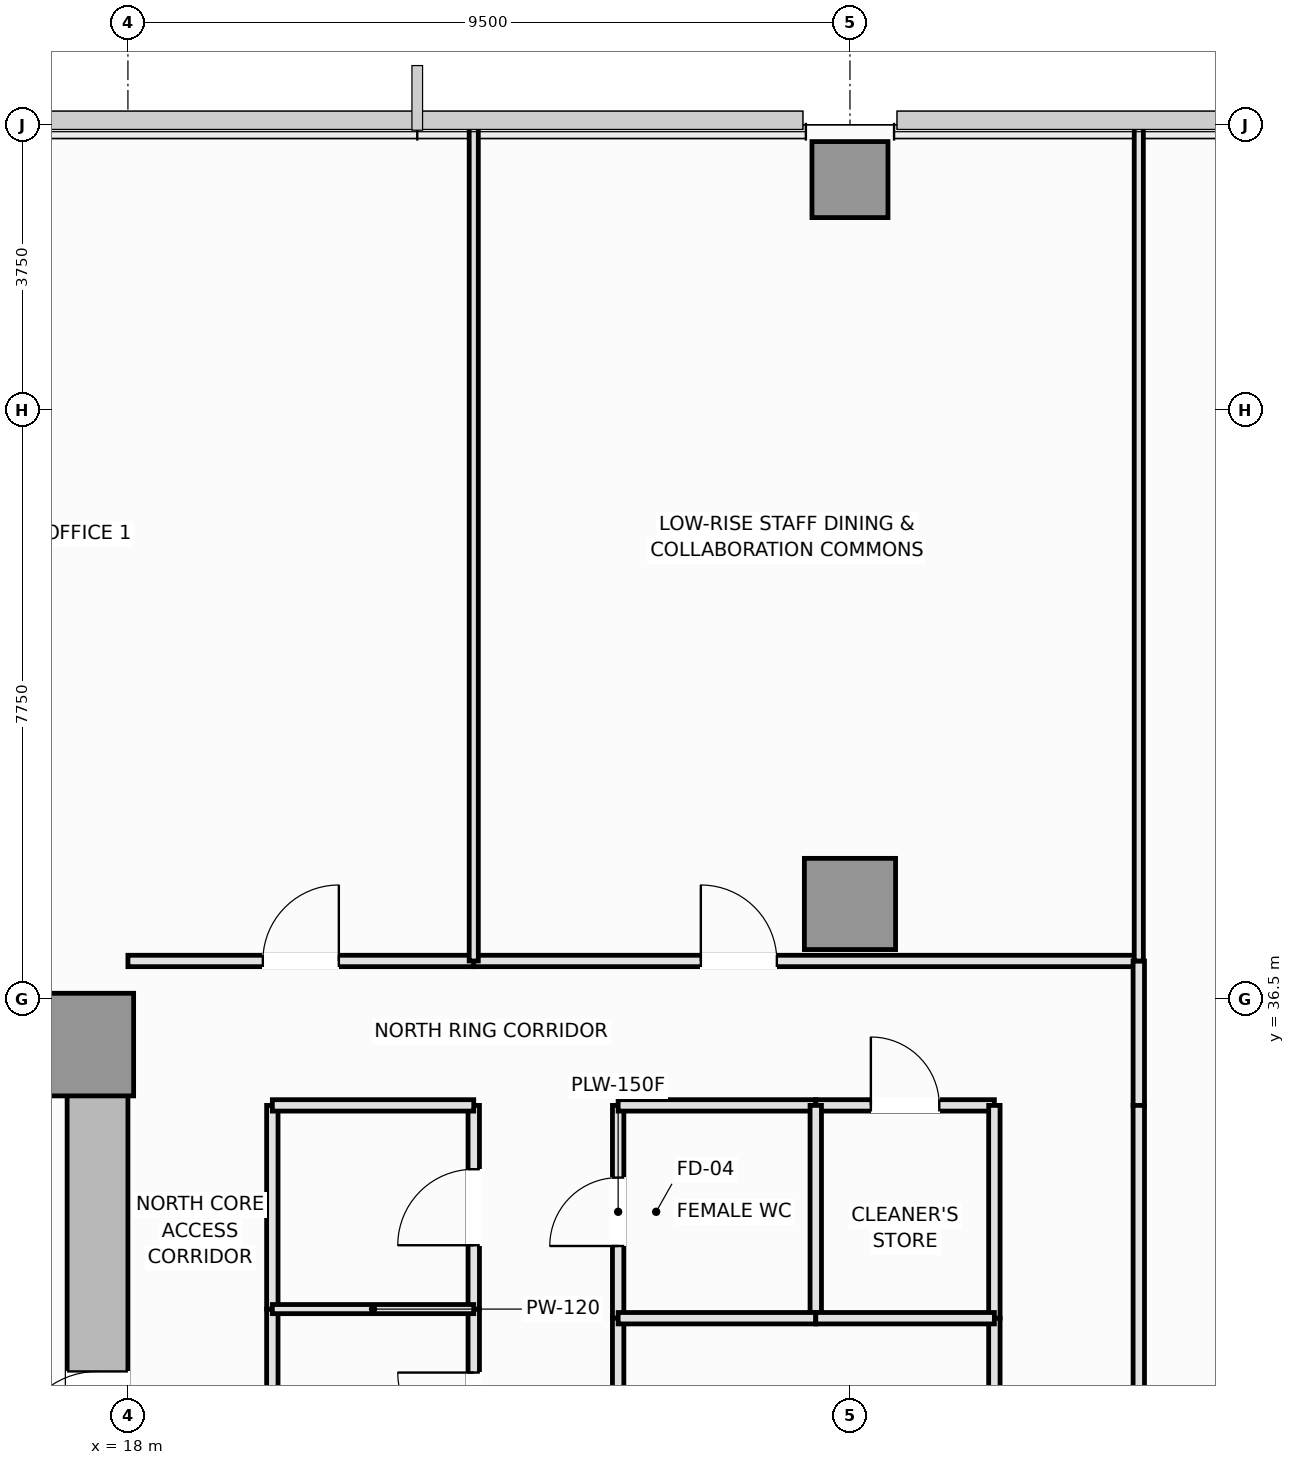
"""IFC4 building model, lengths in metres.
Left out: names, types, materials, properties, quantities, classifications, styles, units other than length and angle.
Written with IfcOpenShell. Run it as: python <this file> out.ifc"""

import sys

from ifc_helpers import new_model, si_unit, direction, frame, frame_2d, origin, origin_2d, place, context, subcontext, project, spatial, rectangle, extrude, element, fill, save


model = new_model("IFC4")
c1 = context("Model", 3, precision=1e-05, world=origin(), true_north=direction((0.0, 1.0)))
c2 = subcontext(c1, "Body", "Model", "MODEL_VIEW")
j1 = project(units=[si_unit("LENGTHUNIT", "METRE"), si_unit("PLANEANGLEUNIT", "RADIAN")], contexts=[c1])
p1 = place(None, origin())
s1 = spatial("IfcSite", under=j1, at=p1, CompositionType="ELEMENT")
p2 = place(p1, origin())
s2 = spatial("IfcBuilding", under=s1, at=p2, CompositionType="ELEMENT")
p3 = place(p2, frame((0.0, 0.0, 89.5)))
s3 = spatial("IfcBuildingStorey", under=s2, at=p3, CompositionType="ELEMENT", Elevation=89.5)
p4 = place(p3, frame((4.5, 36.1, 0.0), z_axis=(0.0, 0.0, 1.0), x_axis=(1.0, 0.0, 0.0)))
e1 = element("IfcWall", 1, at=p4, inside=s3, PredefinedType="SHEAR", context=c2, shape_type="SweptSolid", body=[
    extrude(rectangle(XDim=13.5, YDim=0.8, at=frame_2d((6.75, 0.0))), origin(), (0.0, 0.0, 1.0), 3.55),
])
p5 = place(p3, frame((17.6, 27.05, 0.0), z_axis=(0.0, 0.0, 1.0), x_axis=(0.0, 1.0, 0.0)))
e2 = element("IfcWall", 2, at=p5, inside=s3, PredefinedType="SHEAR", context=c2, shape_type="SweptSolid", body=[
    extrude(rectangle(XDim=8.65, YDim=0.8, at=frame_2d((4.325, 0.0))), origin(), (0.0, 0.0, 1.0), 3.55),
])
p6 = place(p5, frame((3.45, 0.0, 0.0)))
e3 = element("IfcOpeningElement", 3, at=p6, cuts=e2, PredefinedType="OPENING", context=c2, shape_type="SweptSolid", body=[
    extrude(rectangle(XDim=1.1, YDim=2.15, at=frame_2d((0.55, 1.075))), frame((0.0, 0.41, 0.0), z_axis=(0.0, -1.0, 0.0), x_axis=(1.0, 0.0, 0.0)), (0.0, 0.0, 1.0), 0.82),
])
p7 = place(p3, frame((17.4, 35.9, 0.0), z_axis=(0.0, 0.0, 1.0), x_axis=(1.0, 0.0, 0.0)))
e4 = element("IfcColumn", 4, at=p7, inside=s3, PredefinedType="PILASTER", context=c2, shape_type="SweptSolid", body=[
    extrude(rectangle(XDim=1.35, YDim=1.35, at=origin_2d()), origin(), (0.0, 0.0, 1.0), 3.55),
])
p8 = place(p3, frame((27.5, 37.75, 0.0), z_axis=(0.0, 0.0, 1.0), x_axis=(1.0, 0.0, 0.0)))
e5 = element("IfcColumn", 5, at=p8, inside=s3, PredefinedType="COLUMN", context=c2, shape_type="SweptSolid", body=[
    extrude(rectangle(XDim=1.2, YDim=1.2, at=origin_2d()), origin(), (0.0, 0.0, 1.0), 3.55),
])
p9 = place(p3, frame((27.5, 47.28, 0.0), z_axis=(0.0, 0.0, 1.0), x_axis=(1.0, 0.0, 0.0)))
e6 = element("IfcColumn", 6, at=p9, inside=s3, PredefinedType="COLUMN", context=c2, shape_type="SweptSolid", body=[
    extrude(rectangle(XDim=1.0, YDim=1.0, at=origin_2d()), origin(), (0.0, 0.0, 1.0), 3.55),
])
p10 = place(p3, frame((22.55, 29.75, 0.0), z_axis=(0.0, 0.0, 1.0), x_axis=(0.0, 1.0, 0.0)))
e7 = element("IfcWall", 7, at=p10, inside=s3, PredefinedType="PARTITIONING", context=c2, shape_type="SweptSolid", body=[
    extrude(rectangle(XDim=2.67, YDim=0.15, at=frame_2d((1.335, 0.0))), origin(), (0.0, 0.0, 1.0), 2.99),
])
p11 = place(p10, frame((0.835, 0.0, 0.0)))
e8 = element("IfcOpeningElement", 8, at=p11, cuts=e7, PredefinedType="OPENING", context=c2, shape_type="SweptSolid", body=[
    extrude(rectangle(XDim=1.0, YDim=2.15, at=frame_2d((0.5, 1.075))), frame((0.0, 0.085, 0.0), z_axis=(0.0, -1.0, 0.0), x_axis=(1.0, 0.0, 0.0)), (0.0, 0.0, 1.0), 0.17),
])
p12 = place(p3, frame((22.55, 32.42, 0.0), z_axis=(0.0, 0.0, 1.0), x_axis=(0.0, 1.0, 0.0)))
e9 = element("IfcWall", 9, at=p12, inside=s3, PredefinedType="PARTITIONING", context=c2, shape_type="SweptSolid", body=[
    extrude(rectangle(XDim=2.68, YDim=0.15, at=frame_2d((1.34, 0.0))), origin(), (0.0, 0.0, 1.0), 2.99),
])
p13 = place(p12, frame((0.84, 0.0, 0.0)))
e10 = element("IfcOpeningElement", 10, at=p13, cuts=e9, PredefinedType="OPENING", context=c2, shape_type="SweptSolid", body=[
    extrude(rectangle(XDim=1.0, YDim=2.15, at=frame_2d((0.5, 1.075))), frame((0.0, 0.085, 0.0), z_axis=(0.0, -1.0, 0.0), x_axis=(1.0, 0.0, 0.0)), (0.0, 0.0, 1.0), 0.17),
])
p14 = place(p3, frame((24.45, 32.3, 0.0), z_axis=(0.0, 0.0, 1.0), x_axis=(0.0, 1.0, 0.0)))
e11 = element("IfcWall", 11, at=p14, inside=s3, PredefinedType="PLUMBINGWALL", context=c2, shape_type="SweptSolid", body=[
    extrude(rectangle(XDim=2.8, YDim=0.15, at=frame_2d((1.4, 0.0))), origin(), (0.0, 0.0, 1.0), 3.35),
])
p15 = place(p14, frame((0.95, 0.0, 0.0)))
e12 = element("IfcOpeningElement", 12, at=p15, cuts=e11, PredefinedType="OPENING", context=c2, shape_type="SweptSolid", body=[
    extrude(rectangle(XDim=0.9, YDim=2.1, at=frame_2d((0.45, 1.05))), frame((0.0, 0.085, 0.0), z_axis=(0.0, -1.0, 0.0), x_axis=(1.0, 0.0, 0.0)), (0.0, 0.0, 1.0), 0.17),
])
p16 = place(p3, frame((24.45, 29.3, 0.0), z_axis=(0.0, 0.0, 1.0), x_axis=(0.0, 1.0, 0.0)))
e13 = element("IfcWall", 13, at=p16, inside=s3, PredefinedType="PARTITIONING", context=c2, shape_type="SweptSolid", body=[
    extrude(rectangle(XDim=3.0, YDim=0.15, at=frame_2d((1.5, 0.0))), origin(), (0.0, 0.0, 1.0), 3.35),
])
p17 = place(p16, frame((1.0, 0.0, 0.0)))
e14 = element("IfcOpeningElement", 14, at=p17, cuts=e13, PredefinedType="OPENING", context=c2, shape_type="SweptSolid", body=[
    extrude(rectangle(XDim=1.0, YDim=2.15, at=frame_2d((0.5, 1.075))), frame((0.0, 0.085, 0.0), z_axis=(0.0, -1.0, 0.0), x_axis=(1.0, 0.0, 0.0)), (0.0, 0.0, 1.0), 0.17),
])
p18 = place(p3, frame((19.9, 29.75, 0.0), z_axis=(0.0, 0.0, 1.0), x_axis=(0.0, 1.0, 0.0)))
e15 = element("IfcWall", 15, at=p18, inside=s3, PredefinedType="PARTITIONING", context=c2, shape_type="SweptSolid", body=[
    extrude(rectangle(XDim=2.67, YDim=0.15, at=frame_2d((1.335, 0.0))), origin(), (0.0, 0.0, 1.0), 3.35),
])
p19 = place(p3, frame((19.9, 32.42, 0.0), z_axis=(0.0, 0.0, 1.0), x_axis=(0.0, 1.0, 0.0)))
e16 = element("IfcWall", 16, at=p19, inside=s3, PredefinedType="PARTITIONING", context=c2, shape_type="SweptSolid", body=[
    extrude(rectangle(XDim=2.68, YDim=0.15, at=frame_2d((1.34, 0.0))), origin(), (0.0, 0.0, 1.0), 3.35),
])
p20 = place(p3, frame((19.9, 35.1, 0.0), z_axis=(0.0, 0.0, 1.0), x_axis=(1.0, 0.0, 0.0)))
e17 = element("IfcWall", 17, at=p20, inside=s3, PredefinedType="PARTITIONING", context=c2, shape_type="SweptSolid", body=[
    extrude(rectangle(XDim=2.65, YDim=0.15, at=frame_2d((1.325, 0.0))), origin(), (0.0, 0.0, 1.0), 3.35),
])
p21 = place(p3, frame((24.45, 35.1, 0.0), z_axis=(0.0, 0.0, 1.0), x_axis=(1.0, 0.0, 0.0)))
e18 = element("IfcWall", 18, at=p21, inside=s3, PredefinedType="PLUMBINGWALL", context=c2, shape_type="SweptSolid", body=[
    extrude(rectangle(XDim=2.6, YDim=0.15, at=frame_2d((1.3, 0.0))), origin(), (0.0, 0.0, 1.0), 3.35),
])
p22 = place(p3, frame((27.05, 35.1, 0.0), z_axis=(0.0, 0.0, 1.0), x_axis=(1.0, 0.0, 0.0)))
e19 = element("IfcWall", 19, at=p22, inside=s3, PredefinedType="PLUMBINGWALL", context=c2, shape_type="SweptSolid", body=[
    extrude(rectangle(XDim=2.35, YDim=0.15, at=frame_2d((1.175, 0.0))), origin(), (0.0, 0.0, 1.0), 3.35),
])
p23 = place(p22, frame((0.725, 0.0, 0.0)))
e20 = element("IfcOpeningElement", 20, at=p23, cuts=e19, PredefinedType="OPENING", context=c2, shape_type="SweptSolid", body=[
    extrude(rectangle(XDim=0.9, YDim=2.1, at=frame_2d((0.45, 1.05))), frame((0.0, 0.085, 0.0), z_axis=(0.0, -1.0, 0.0), x_axis=(1.0, 0.0, 0.0)), (0.0, 0.0, 1.0), 0.17),
])
p24 = place(p3, frame((18.0, 37.0, 0.0), z_axis=(0.0, 0.0, 1.0), x_axis=(1.0, 0.0, 0.0)))
e21 = element("IfcWall", 21, at=p24, inside=s3, PredefinedType="PARTITIONING", context=c2, shape_type="SweptSolid", body=[
    extrude(rectangle(XDim=4.55, YDim=0.15, at=frame_2d((2.275, 0.0))), origin(), (0.0, 0.0, 1.0), 3.35),
])
p25 = place(p24, frame((1.775, 0.0, 0.0)))
e22 = element("IfcOpeningElement", 22, at=p25, cuts=e21, PredefinedType="OPENING", context=c2, shape_type="SweptSolid", body=[
    extrude(rectangle(XDim=1.0, YDim=2.15, at=frame_2d((0.5, 1.075))), frame((0.0, 0.085, 0.0), z_axis=(0.0, -1.0, 0.0), x_axis=(1.0, 0.0, 0.0)), (0.0, 0.0, 1.0), 0.17),
])
p26 = place(p3, frame((22.55, 37.0, 0.0), z_axis=(0.0, 0.0, 1.0), x_axis=(1.0, 0.0, 0.0)))
e23 = element("IfcWall", 23, at=p26, inside=s3, PredefinedType="PARTITIONING", context=c2, shape_type="SweptSolid", body=[
    extrude(rectangle(XDim=8.75, YDim=0.15, at=frame_2d((4.375, 0.0))), origin(), (0.0, 0.0, 1.0), 3.35),
])
p27 = place(p26, frame((2.988, 0.0, 0.0)))
e24 = element("IfcOpeningElement", 24, at=p27, cuts=e23, PredefinedType="OPENING", context=c2, shape_type="SweptSolid", body=[
    extrude(rectangle(XDim=1.0, YDim=2.15, at=frame_2d((0.5, 1.075))), frame((0.0, 0.085, 0.0), z_axis=(0.0, -1.0, 0.0), x_axis=(1.0, 0.0, 0.0)), (0.0, 0.0, 1.0), 0.17),
])
p28 = place(p3, frame((31.3, 35.1, 0.0), z_axis=(0.0, 0.0, 1.0), x_axis=(0.0, 1.0, 0.0)))
e25 = element("IfcWall", 25, at=p28, inside=s3, PredefinedType="PARTITIONING", context=c2, shape_type="SweptSolid", body=[
    extrude(rectangle(XDim=1.9, YDim=0.15, at=frame_2d((0.95, 0.0))), origin(), (0.0, 0.0, 1.0), 3.35),
])
p29 = place(p3, frame((29.4, 32.3, 0.0), z_axis=(0.0, 0.0, 1.0), x_axis=(0.0, 1.0, 0.0)))
e26 = element("IfcWall", 26, at=p29, inside=s3, PredefinedType="PLUMBINGWALL", context=c2, shape_type="SweptSolid", body=[
    extrude(rectangle(XDim=2.8, YDim=0.15, at=frame_2d((1.4, 0.0))), origin(), (0.0, 0.0, 1.0), 3.35),
])
p30 = place(p3, frame((29.4, 29.3, 0.0), z_axis=(0.0, 0.0, 1.0), x_axis=(0.0, 1.0, 0.0)))
e27 = element("IfcWall", 27, at=p30, inside=s3, PredefinedType="PARTITIONING", context=c2, shape_type="SweptSolid", body=[
    extrude(rectangle(XDim=3.0, YDim=0.15, at=frame_2d((1.5, 0.0))), origin(), (0.0, 0.0, 1.0), 3.35),
])
p31 = place(p3, frame((31.3, 18.5, 0.0), z_axis=(0.0, 0.0, 1.0), x_axis=(0.0, 1.0, 0.0)))
e28 = element("IfcWall", 28, at=p31, inside=s3, PredefinedType="PARTITIONING", context=c2, shape_type="SweptSolid", body=[
    extrude(rectangle(XDim=16.6, YDim=0.15, at=frame_2d((8.3, 0.0))), origin(), (0.0, 0.0, 1.0), 3.35),
])
p32 = place(p31, frame((7.4, 0.0, 0.0)))
e29 = element("IfcOpeningElement", 29, at=p32, cuts=e28, PredefinedType="OPENING", context=c2, shape_type="SweptSolid", body=[
    extrude(rectangle(XDim=1.8, YDim=2.2, at=frame_2d((0.9, 1.1))), frame((0.0, 0.085, 0.0), z_axis=(0.0, -1.0, 0.0), x_axis=(1.0, 0.0, 0.0)), (0.0, 0.0, 1.0), 0.17),
])
p33 = place(p3, frame((19.9, 32.42, 0.0), z_axis=(0.0, 0.0, 1.0), x_axis=(1.0, 0.0, 0.0)))
e30 = element("IfcWall", 30, at=p33, inside=s3, PredefinedType="PARTITIONING", context=c2, shape_type="SweptSolid", body=[
    extrude(rectangle(XDim=2.65, YDim=0.12, at=frame_2d((1.325, 0.0))), origin(), (0.0, 0.0, 1.0), 3.35),
])
p34 = place(p3, frame((27.05, 32.3, 0.0), z_axis=(0.0, 0.0, 1.0), x_axis=(0.0, 1.0, 0.0)))
e31 = element("IfcWall", 31, at=p34, inside=s3, PredefinedType="PLUMBINGWALL", context=c2, shape_type="SweptSolid", body=[
    extrude(rectangle(XDim=2.8, YDim=0.15, at=frame_2d((1.4, 0.0))), origin(), (0.0, 0.0, 1.0), 3.35),
])
p35 = place(p3, frame((24.45, 32.3, 0.0), z_axis=(0.0, 0.0, 1.0), x_axis=(1.0, 0.0, 0.0)))
e32 = element("IfcWall", 32, at=p35, inside=s3, PredefinedType="PLUMBINGWALL", context=c2, shape_type="SweptSolid", body=[
    extrude(rectangle(XDim=2.6, YDim=0.15, at=frame_2d((1.3, 0.0))), origin(), (0.0, 0.0, 1.0), 3.35),
])
p36 = place(p3, frame((27.05, 32.3, 0.0), z_axis=(0.0, 0.0, 1.0), x_axis=(1.0, 0.0, 0.0)))
e33 = element("IfcWall", 33, at=p36, inside=s3, PredefinedType="PLUMBINGWALL", context=c2, shape_type="SweptSolid", body=[
    extrude(rectangle(XDim=2.35, YDim=0.15, at=frame_2d((1.175, 0.0))), origin(), (0.0, 0.0, 1.0), 3.35),
])
p37 = place(p3, frame((22.55, 37.0, 0.0), z_axis=(0.0, 0.0, 1.0), x_axis=(0.0, 1.0, 0.0)))
e34 = element("IfcWall", 34, at=p37, inside=s3, PredefinedType="PARTITIONING", context=c2, shape_type="SweptSolid", body=[
    extrude(rectangle(XDim=10.99, YDim=0.12, at=frame_2d((5.495, 0.0))), origin(), (0.0, 0.0, 1.0), 2.99),
])
p38 = place(p3, frame((31.3, 37.0, 0.0), z_axis=(0.0, 0.0, 1.0), x_axis=(0.0, 1.0, 0.0)))
e35 = element("IfcWall", 35, at=p38, inside=s3, PredefinedType="PARTITIONING", context=c2, shape_type="SweptSolid", body=[
    extrude(rectangle(XDim=10.99, YDim=0.12, at=frame_2d((5.495, 0.0))), origin(), (0.0, 0.0, 1.0), 3.35),
])
p39 = place(p6, origin())
e36 = element("IfcDoor", 36, at=p39, inside=s3, OperationType="SINGLE_SWING_LEFT", PredefinedType="DOOR", context=c2, shape_type="SweptSolid", body=[
    extrude(rectangle(XDim=1.1, YDim=2.15, at=frame_2d((0.55, 1.075))), frame((0.0, 0.025, 0.0), z_axis=(0.0, -1.0, 0.0), x_axis=(1.0, 0.0, 0.0)), (0.0, 0.0, 1.0), 0.05),
])
fill(e3, e36)
p40 = place(p11, origin())
e37 = element("IfcDoor", 37, at=p40, inside=s3, OperationType="SINGLE_SWING_RIGHT", PredefinedType="DOOR", context=c2, shape_type="SweptSolid", body=[
    extrude(rectangle(XDim=1.0, YDim=2.15, at=frame_2d((0.5, 1.075))), frame((0.0, 0.025, 0.0), z_axis=(0.0, -1.0, 0.0), x_axis=(1.0, 0.0, 0.0)), (0.0, 0.0, 1.0), 0.05),
])
fill(e8, e37)
p41 = place(p13, origin())
e38 = element("IfcDoor", 38, at=p41, inside=s3, OperationType="SINGLE_SWING_LEFT", PredefinedType="DOOR", context=c2, shape_type="SweptSolid", body=[
    extrude(rectangle(XDim=1.0, YDim=2.15, at=frame_2d((0.5, 1.075))), frame((0.0, 0.025, 0.0), z_axis=(0.0, -1.0, 0.0), x_axis=(1.0, 0.0, 0.0)), (0.0, 0.0, 1.0), 0.05),
])
fill(e10, e38)
p42 = place(p15, origin())
e39 = element("IfcDoor", 39, at=p42, inside=s3, OperationType="SINGLE_SWING_LEFT", PredefinedType="DOOR", context=c2, shape_type="SweptSolid", body=[
    extrude(rectangle(XDim=0.9, YDim=2.1, at=frame_2d((0.45, 1.05))), frame((0.0, 0.025, 0.0), z_axis=(0.0, -1.0, 0.0), x_axis=(1.0, 0.0, 0.0)), (0.0, 0.0, 1.0), 0.05),
])
fill(e12, e39)
p43 = place(p23, origin())
e40 = element("IfcDoor", 40, at=p43, inside=s3, OperationType="SINGLE_SWING_LEFT", PredefinedType="DOOR", context=c2, shape_type="SweptSolid", body=[
    extrude(rectangle(XDim=0.9, YDim=2.1, at=frame_2d((0.45, 1.05))), frame((0.0, 0.025, 0.0), z_axis=(0.0, -1.0, 0.0), x_axis=(1.0, 0.0, 0.0)), (0.0, 0.0, 1.0), 0.05),
])
fill(e20, e40)
p44 = place(p25, origin())
e41 = element("IfcDoor", 41, at=p44, inside=s3, OperationType="SINGLE_SWING_RIGHT", PredefinedType="DOOR", context=c2, shape_type="SweptSolid", body=[
    extrude(rectangle(XDim=1.0, YDim=2.15, at=frame_2d((0.5, 1.075))), frame((0.0, 0.025, 0.0), z_axis=(0.0, -1.0, 0.0), x_axis=(1.0, 0.0, 0.0)), (0.0, 0.0, 1.0), 0.05),
])
fill(e22, e41)
p45 = place(p27, origin())
e42 = element("IfcDoor", 42, at=p45, inside=s3, OperationType="SINGLE_SWING_LEFT", PredefinedType="DOOR", context=c2, shape_type="SweptSolid", body=[
    extrude(rectangle(XDim=1.0, YDim=2.15, at=frame_2d((0.5, 1.075))), frame((0.0, 0.025, 0.0), z_axis=(0.0, -1.0, 0.0), x_axis=(1.0, 0.0, 0.0)), (0.0, 0.0, 1.0), 0.05),
])
fill(e24, e42)
save(model, sys.argv[1])
